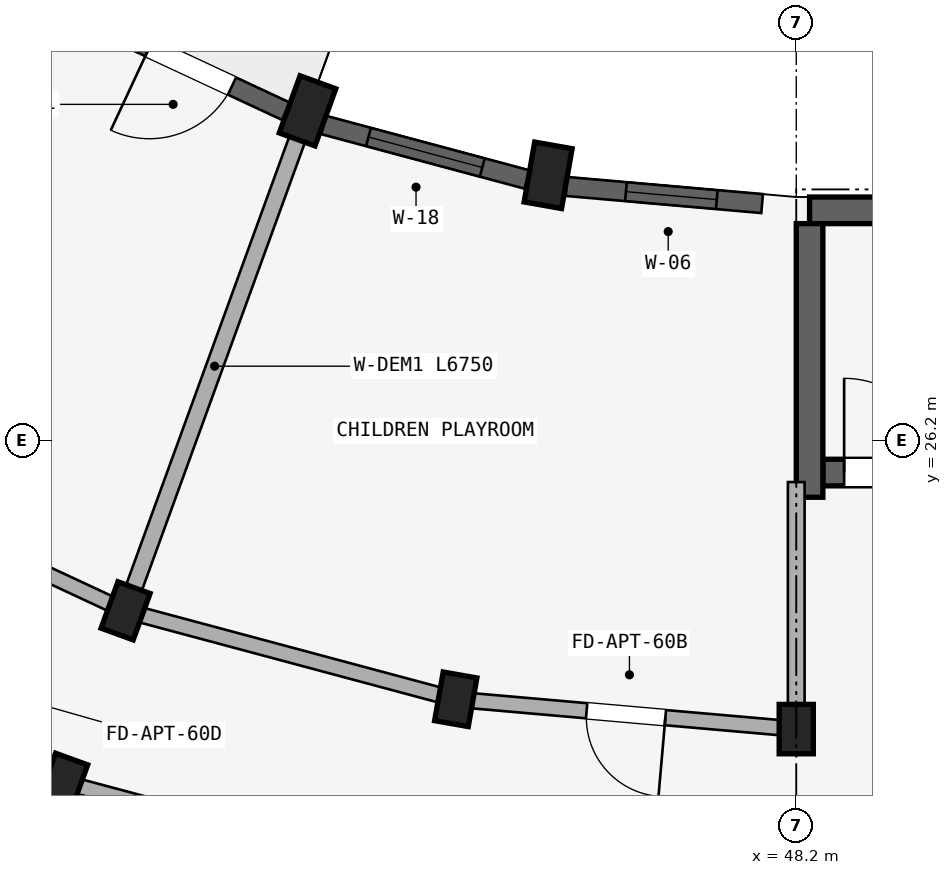
"""IFC4 building model, lengths in metres.
Left out: names, types, materials, properties, quantities, classifications, styles, units other than length and angle.
Written with IfcOpenShell. Run it as: python <this file> out.ifc"""

import sys

from ifc_helpers import new_model, si_unit, direction, frame, frame_2d, origin, origin_2d, place, context, subcontext, project, spatial, rectangle, extrude, element, fill, save


model = new_model("IFC4")
c1 = context("Model", 3, precision=1e-05, world=origin(), true_north=direction((0.0, 1.0)))
c2 = subcontext(c1, "Body", "Model", "MODEL_VIEW")
j1 = project(units=[si_unit("LENGTHUNIT", "METRE"), si_unit("PLANEANGLEUNIT", "RADIAN")], contexts=[c1])
p1 = place(None, origin())
s1 = spatial("IfcSite", under=j1, at=p1, CompositionType="ELEMENT")
p2 = place(p1, origin())
s2 = spatial("IfcBuilding", under=s1, at=p2, CompositionType="ELEMENT")
p3 = place(p2, frame((0.0, 0.0, 27.6)))
s3 = spatial("IfcBuildingStorey", under=s2, at=p3, CompositionType="ELEMENT", Elevation=27.6)
p4 = place(p3, frame((48.375, 29.225, 0.0), z_axis=(0.0, 0.0, 1.0), x_axis=(1.0, 0.0, 0.0)))
e1 = element("IfcWall", 1, at=p4, inside=s3, PredefinedType="SHEAR", context=c2, shape_type="SweptSolid", body=[
    extrude(rectangle(XDim=8.25, YDim=0.35, at=frame_2d((4.125, 0.0))), origin(), (0.0, 0.0, 1.0), 2.93),
])
p5 = place(p3, frame((48.55, 25.775, 0.0), z_axis=(0.0, 0.0, 1.0), x_axis=(1.0, 0.0, 0.0)))
e2 = element("IfcWall", 2, at=p5, inside=s3, PredefinedType="SHEAR", context=c2, shape_type="SweptSolid", body=[
    extrude(rectangle(XDim=7.9, YDim=0.35, at=frame_2d((3.95, 0.0))), origin(), (0.0, 0.0, 1.0), 2.93),
])
p6 = place(p5, frame((0.28, 0.0, 0.0)))
e3 = element("IfcOpeningElement", 3, at=p6, cuts=e2, PredefinedType="OPENING", context=c2, shape_type="SweptSolid", body=[
    extrude(rectangle(XDim=1.24, YDim=2.15, at=frame_2d((0.62, 1.075))), frame((0.0, 0.185, 0.0), z_axis=(0.0, -1.0, 0.0), x_axis=(1.0, 0.0, 0.0)), (0.0, 0.0, 1.0), 0.37),
])
p7 = place(p3, frame((48.375, 29.05, 0.0), z_axis=(0.0, 0.0, 1.0), x_axis=(0.0, -1.0, 0.0)))
e4 = element("IfcWall", 4, at=p7, inside=s3, PredefinedType="SHEAR", context=c2, shape_type="SweptSolid", body=[
    extrude(rectangle(XDim=3.6, YDim=0.35, at=frame_2d((1.8, 0.0))), origin(), (0.0, 0.0, 1.0), 2.93),
])
p8 = place(p3, frame((48.2, 22.4, 0.0), z_axis=(0.0, 0.0, 1.0), x_axis=(1.0, 0.0, 0.0)))
e5 = element("IfcColumn", 5, at=p8, inside=s3, PredefinedType="COLUMN", context=c2, shape_type="SweptSolid", body=[
    extrude(rectangle(XDim=0.45, YDim=0.65, at=origin_2d()), origin(), (0.0, 0.0, 1.0), 2.93),
])
p9 = place(p3, frame((44.935, 29.686, 0.0), z_axis=(0.0, 0.0, 1.0), x_axis=(-0.984807753012, 0.173648177667, 0.0)))
e6 = element("IfcColumn", 6, at=p9, inside=s3, PredefinedType="COLUMN", context=c2, shape_type="SweptSolid", body=[
    extrude(rectangle(XDim=0.5, YDim=0.8, at=origin_2d()), origin(), (0.0, 0.0, 1.0), 2.93),
])
p10 = place(p3, frame((43.72, 22.792, 0.0), z_axis=(0.0, 0.0, 1.0), x_axis=(-0.984807753012, 0.173648177667, 0.0)))
e7 = element("IfcColumn", 7, at=p10, inside=s3, PredefinedType="COLUMN", context=c2, shape_type="SweptSolid", body=[
    extrude(rectangle(XDim=0.45, YDim=0.65, at=origin_2d()), origin(), (0.0, 0.0, 1.0), 2.93),
])
p11 = place(p3, frame((41.77, 30.534, 0.0), z_axis=(0.0, 0.0, 1.0), x_axis=(-0.939692620786, 0.342020143326, 0.0)))
e8 = element("IfcColumn", 8, at=p11, inside=s3, PredefinedType="COLUMN", context=c2, shape_type="SweptSolid", body=[
    extrude(rectangle(XDim=0.5, YDim=0.8, at=origin_2d()), origin(), (0.0, 0.0, 1.0), 2.93),
])
for number, where, z_axis, x_axis in (
    (9, (39.376, 23.956, 0.0), (0.0, 0.0, 1.0), (-0.94, 0.342, 0.0)),
    (10, (38.555, 21.701, 0.0), (0.0, 0.0, 1.0), (-0.94, 0.342, 0.0)),
):
    element("IfcColumn", number, at=place(p3, frame(where, z_axis=z_axis, x_axis=x_axis)), inside=s3, PredefinedType="COLUMN", context=c2, shape_type="SweptSolid", body=[
        extrude(rectangle(XDim=0.45, YDim=0.65, at=origin_2d()), origin(), (0.0, 0.0, 1.0), 2.93),
    ])
p12 = place(p3, frame((48.2, 22.4, 0.0), z_axis=(0.0, 0.0, 1.0), x_axis=(-0.996191949488, 0.087187153726, 0.0)))
e11 = element("IfcWall", 11, at=p12, inside=s3, PredefinedType="STANDARD", context=c2, shape_type="SweptSolid", body=[
    extrude(rectangle(XDim=4.497, YDim=0.2, at=frame_2d((2.249, 0.0))), origin(), (0.0, 0.0, 1.0), 2.372),
])
p13 = place(p12, frame((1.729, 0.0, 0.0)))
e12 = element("IfcOpeningElement", 12, at=p13, cuts=e11, PredefinedType="OPENING", context=c2, shape_type="SweptSolid", body=[
    extrude(rectangle(XDim=1.04, YDim=2.15, at=frame_2d((0.52, 1.075))), frame((0.0, 0.11, 0.0), z_axis=(0.0, -1.0, 0.0), x_axis=(1.0, 0.0, 0.0)), (0.0, 0.0, 1.0), 0.22),
])
p14 = place(p3, frame((43.72, 22.792, 0.0), z_axis=(0.0, 0.0, 1.0), x_axis=(-0.965934240054, 0.258787642463, 0.0)))
e13 = element("IfcWall", 13, at=p14, inside=s3, PredefinedType="STANDARD", context=c2, shape_type="SweptSolid", body=[
    extrude(rectangle(XDim=4.497, YDim=0.2, at=frame_2d((2.249, 0.0))), origin(), (0.0, 0.0, 1.0), 2.372),
])
p15 = place(p3, frame((43.303, 20.428, 0.0), z_axis=(0.0, 0.0, 1.0), x_axis=(-0.965930095386, 0.258803112091, 0.0)))
e14 = element("IfcWall", 14, at=p15, inside=s3, PredefinedType="STANDARD", context=c2, shape_type="SweptSolid", body=[
    extrude(rectangle(XDim=4.916, YDim=0.2, at=frame_2d((2.458, 0.0))), origin(), (0.0, 0.0, 1.0), 2.372),
])
p16 = place(p3, frame((39.376, 23.956, 0.0), z_axis=(0.0, 0.0, 1.0), x_axis=(-0.906307919131, 0.422617978463, 0.0)))
e15 = element("IfcWall", 15, at=p16, inside=s3, PredefinedType="STANDARD", context=c2, shape_type="SweptSolid", body=[
    extrude(rectangle(XDim=4.497, YDim=0.2, at=frame_2d((2.249, 0.0))), origin(), (0.0, 0.0, 1.0), 2.372),
])
p17 = place(p16, frame((1.709, 0.0, 0.0)))
e16 = element("IfcOpeningElement", 16, at=p17, cuts=e15, PredefinedType="OPENING", context=c2, shape_type="SweptSolid", body=[
    extrude(rectangle(XDim=1.08, YDim=2.15, at=frame_2d((0.54, 1.075))), frame((0.0, 0.11, 0.0), z_axis=(0.0, -1.0, 0.0), x_axis=(1.0, 0.0, 0.0)), (0.0, 0.0, 1.0), 0.22),
])
p18 = place(p3, frame((38.555, 21.701, 0.0), z_axis=(0.0, 0.0, 1.0), x_axis=(-0.906302381024, 0.422629854778, 0.0)))
e17 = element("IfcWall", 17, at=p18, inside=s3, PredefinedType="STANDARD", context=c2, shape_type="SweptSolid", body=[
    extrude(rectangle(XDim=4.915, YDim=0.2, at=frame_2d((2.458, 0.0))), origin(), (0.0, 0.0, 1.0), 2.372),
])
p19 = place(p18, frame((1.888, 0.0, 0.0)))
e18 = element("IfcOpeningElement", 18, at=p19, cuts=e17, PredefinedType="OPENING", context=c2, shape_type="SweptSolid", body=[
    extrude(rectangle(XDim=1.14, YDim=2.15, at=frame_2d((0.57, 1.075))), frame((0.0, 0.11, 0.0), z_axis=(0.0, -1.0, 0.0), x_axis=(1.0, 0.0, 0.0)), (0.0, 0.0, 1.0), 0.22),
])
p20 = place(p3, frame((48.2, 25.65, 0.0), z_axis=(0.0, 0.0, 1.0), x_axis=(0.0, -1.0, 0.0)))
e19 = element("IfcWall", 19, at=p20, inside=s3, PredefinedType="STANDARD", context=c2, shape_type="SweptSolid", body=[
    extrude(rectangle(XDim=3.2, YDim=0.22, at=frame_2d((1.6, 0.0))), origin(), (0.0, 0.0, 1.0), 2.372),
])
p21 = place(p3, frame((41.702, 30.346, 0.0), z_axis=(0.0, 0.0, 1.0), x_axis=(-0.342010221662, -0.939696231917, 0.0)))
e20 = element("IfcWall", 20, at=p21, inside=s3, PredefinedType="STANDARD", context=c2, shape_type="SweptSolid", body=[
    extrude(rectangle(XDim=6.75, YDim=0.22, at=frame_2d((3.375, 0.0))), origin(), (0.0, 0.0, 1.0), 2.372),
])
p22 = place(p3, frame((38.521, 21.607, 0.0), z_axis=(0.0, 0.0, 1.0), x_axis=(-0.342012528828, -0.939695392201, 0.0)))
e21 = element("IfcWall", 21, at=p22, inside=s3, PredefinedType="STANDARD", context=c2, shape_type="SweptSolid", body=[
    extrude(rectangle(XDim=9.02, YDim=0.22, at=frame_2d((4.51, 0.0))), origin(), (0.0, 0.0, 1.0), 2.372),
])
p23 = place(p3, frame((47.751, 29.314, 0.0), z_axis=(0.0, 0.0, 1.0), x_axis=(-0.996188278786, 0.087229084652, 0.0)))
e22 = element("IfcWall", 22, at=p23, inside=s3, PredefinedType="STANDARD", context=c2, shape_type="SweptSolid", body=[
    extrude(rectangle(XDim=2.583, YDim=0.25, at=frame_2d((1.292, 0.0))), origin(), (0.0, 0.0, 1.0), 2.472),
])
p24 = place(p23, frame((0.599, 0.0, 0.772)))
e23 = element("IfcOpeningElement", 23, at=p24, cuts=e22, PredefinedType="OPENING", context=c2, shape_type="SweptSolid", body=[
    extrude(rectangle(XDim=1.2, YDim=1.5, at=frame_2d((0.6, 0.75))), frame((0.0, 0.135, 0.0), z_axis=(0.0, -1.0, 0.0), x_axis=(1.0, 0.0, 0.0)), (0.0, 0.0, 1.0), 0.27),
])
p25 = place(p3, frame((44.658, 29.631, 0.0), z_axis=(0.0, 0.0, 1.0), x_axis=(-0.965935855992, 0.25878161084, 0.0)))
e24 = element("IfcWall", 24, at=p25, inside=s3, PredefinedType="STANDARD", context=c2, shape_type="SweptSolid", body=[
    extrude(rectangle(XDim=2.77, YDim=0.25, at=frame_2d((1.385, 0.0))), origin(), (0.0, 0.0, 1.0), 2.472),
])
p26 = place(p25, frame((0.61, 0.0, 0.672)))
e25 = element("IfcOpeningElement", 25, at=p26, cuts=e24, PredefinedType="OPENING", context=c2, shape_type="SweptSolid", body=[
    extrude(rectangle(XDim=1.55, YDim=1.6, at=frame_2d((0.775, 0.8))), frame((0.0, 0.135, 0.0), z_axis=(0.0, -1.0, 0.0), x_axis=(1.0, 0.0, 0.0)), (0.0, 0.0, 1.0), 0.27),
])
p27 = place(p3, frame((41.487, 30.528, 0.0), z_axis=(0.0, 0.0, 1.0), x_axis=(-0.906293449611, 0.422649007088, 0.0)))
e26 = element("IfcWall", 26, at=p27, inside=s3, PredefinedType="STANDARD", context=c2, shape_type="SweptSolid", body=[
    extrude(rectangle(XDim=2.77, YDim=0.25, at=frame_2d((1.385, 0.0))), origin(), (0.0, 0.0, 1.0), 2.472),
])
p28 = place(p27, frame((0.785, 0.0, 0.0)))
e27 = element("IfcOpeningElement", 27, at=p28, cuts=e26, PredefinedType="OPENING", context=c2, shape_type="SweptSolid", body=[
    extrude(rectangle(XDim=1.2, YDim=2.15, at=frame_2d((0.6, 1.075))), frame((0.0, 0.135, 0.0), z_axis=(0.0, -1.0, 0.0), x_axis=(1.0, 0.0, 0.0)), (0.0, 0.0, 1.0), 0.27),
])
p29 = place(p24, origin())
e28 = element("IfcWindow", 28, at=p29, inside=s3, PartitioningType="SINGLE_PANEL", PredefinedType="WINDOW", context=c2, shape_type="SweptSolid", body=[
    extrude(rectangle(XDim=1.2, YDim=1.5, at=frame_2d((0.6, 0.75))), frame((0.0, 0.03, 0.0), z_axis=(0.0, -1.0, 0.0), x_axis=(1.0, 0.0, 0.0)), (0.0, 0.0, 1.0), 0.06),
])
fill(e23, e28)
p30 = place(p26, origin())
e29 = element("IfcWindow", 29, at=p30, inside=s3, PartitioningType="DOUBLE_PANEL_VERTICAL", PredefinedType="WINDOW", context=c2, shape_type="SweptSolid", body=[
    extrude(rectangle(XDim=1.55, YDim=1.6, at=frame_2d((0.775, 0.8))), frame((0.0, 0.03, 0.0), z_axis=(0.0, -1.0, 0.0), x_axis=(1.0, 0.0, 0.0)), (0.0, 0.0, 1.0), 0.06),
])
fill(e25, e29)
p31 = place(p6, origin())
e30 = element("IfcDoor", 30, at=p31, inside=s3, OperationType="SINGLE_SWING_LEFT", PredefinedType="DOOR", context=c2, shape_type="SweptSolid", body=[
    extrude(rectangle(XDim=1.24, YDim=2.15, at=frame_2d((0.62, 1.075))), frame((0.0, 0.025, 0.0), z_axis=(0.0, -1.0, 0.0), x_axis=(1.0, 0.0, 0.0)), (0.0, 0.0, 1.0), 0.05),
])
fill(e3, e30)
p32 = place(p13, origin())
e31 = element("IfcDoor", 31, at=p32, inside=s3, OperationType="SINGLE_SWING_LEFT", PredefinedType="DOOR", context=c2, shape_type="SweptSolid", body=[
    extrude(rectangle(XDim=1.04, YDim=2.15, at=frame_2d((0.52, 1.075))), frame((0.0, 0.025, 0.0), z_axis=(0.0, -1.0, 0.0), x_axis=(1.0, 0.0, 0.0)), (0.0, 0.0, 1.0), 0.05),
])
fill(e12, e31)
p33 = place(p28, frame((1.2, 0.0, 0.0), z_axis=(0.0, 0.0, 1.0), x_axis=(-1.0, 0.0, 0.0)))
e32 = element("IfcDoor", 32, at=p33, inside=s3, OperationType="SINGLE_SWING_LEFT", PredefinedType="DOOR", context=c2, shape_type="SweptSolid", body=[
    extrude(rectangle(XDim=1.2, YDim=2.15, at=frame_2d((0.6, 1.075))), frame((0.0, 0.025, 0.0), z_axis=(0.0, -1.0, 0.0), x_axis=(1.0, 0.0, 0.0)), (0.0, 0.0, 1.0), 0.05),
])
fill(e27, e32)
save(model, sys.argv[1])
